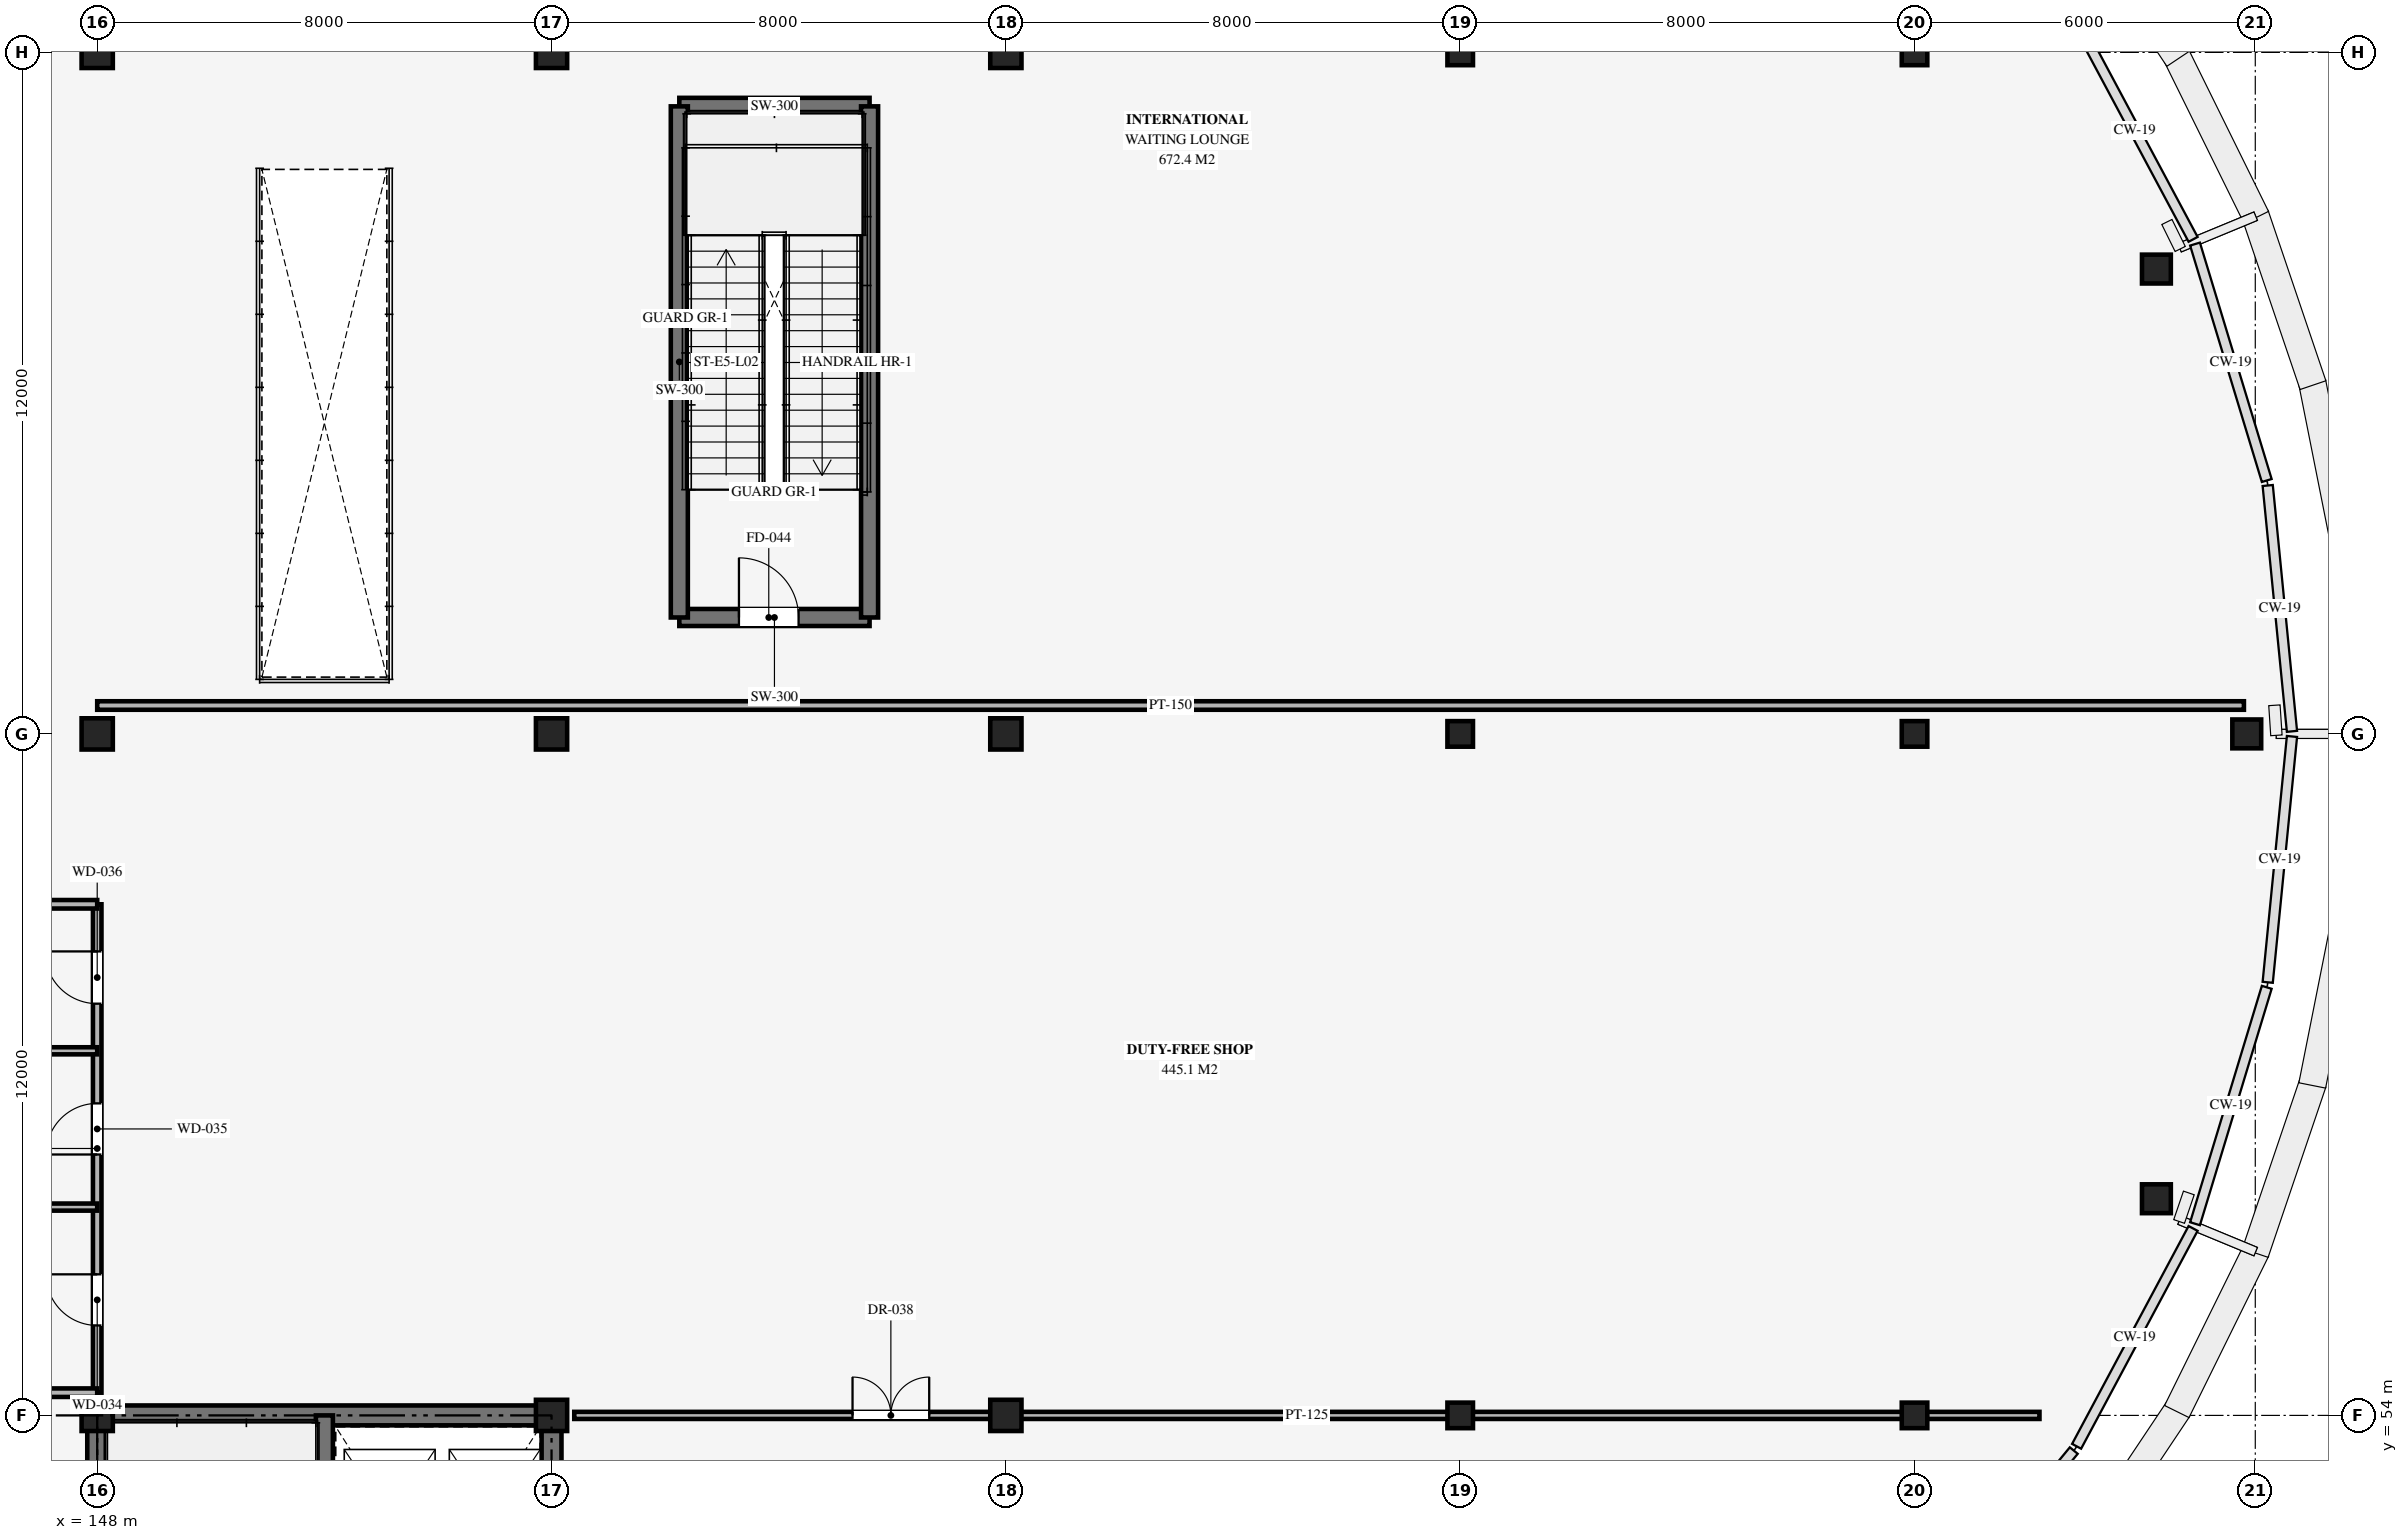
"""IFC4 building model, lengths in metres.
Left out: names, types, materials, properties, quantities, classifications, styles, units other than length and angle.
Written with IfcOpenShell. Run it as: python <this file> out.ifc"""

import sys

from ifc_helpers import new_model, si_unit, direction, frame, frame_2d, origin, origin_2d, place, context, subcontext, project, spatial, rectangle, hollow_circle, extrude, element, fill, save


model = new_model("IFC4")
c1 = context("Model", 3, precision=1e-05, world=origin(), true_north=direction((0.0, 1.0)))
c2 = subcontext(c1, "Body", "Model", "MODEL_VIEW")
j1 = project(units=[si_unit("LENGTHUNIT", "METRE"), si_unit("PLANEANGLEUNIT", "RADIAN")], contexts=[c1])
p1 = place(None, origin())
s1 = spatial("IfcSite", under=j1, at=p1, CompositionType="ELEMENT")
p2 = place(p1, origin())
s2 = spatial("IfcBuilding", under=s1, at=p2, CompositionType="ELEMENT")
p3 = place(p2, frame((0.0, 0.0, 10.2)))
s3 = spatial("IfcBuildingStorey", under=s2, at=p3, CompositionType="ELEMENT", Elevation=10.2)
for number, where, z_axis, x_axis in (
    (1, (148.0, 54.0, 0.0), (0.0, 0.0, 1.0), (1.0, 0.0, 0.0)),
    (2, (148.0, 66.0, 0.0), (0.0, 0.0, 1.0), (1.0, 0.0, 0.0)),
    (3, (148.0, 78.0, 0.0), (0.0, 0.0, 1.0), (1.0, 0.0, 0.0)),
    (4, (156.0, 54.0, 0.0), (0.0, 0.0, 1.0), (1.0, 0.0, 0.0)),
    (5, (156.0, 66.0, 0.0), (0.0, 0.0, 1.0), (1.0, 0.0, 0.0)),
    (6, (156.0, 78.0, 0.0), (0.0, 0.0, 1.0), (1.0, 0.0, 0.0)),
    (7, (164.0, 54.0, 0.0), (0.0, 0.0, 1.0), (1.0, 0.0, 0.0)),
    (8, (164.0, 66.0, 0.0), (0.0, 0.0, 1.0), (1.0, 0.0, 0.0)),
    (9, (164.0, 78.0, 0.0), (0.0, 0.0, 1.0), (1.0, 0.0, 0.0)),
):
    element("IfcColumn", number, at=place(p3, frame(where, z_axis=z_axis, x_axis=x_axis)), inside=s3, PredefinedType="COLUMN", context=c2, shape_type="SweptSolid", body=[
        extrude(rectangle(XDim=0.55, YDim=0.55, at=origin_2d()), origin(), (0.0, 0.0, 1.0), 4.64),
    ])
for number, where, z_axis, x_axis in (
    (10, (172.0, 54.0, 0.0), (0.0, 0.0, 1.0), (1.0, 0.0, 0.0)),
    (11, (172.0, 66.0, 0.0), (0.0, 0.0, 1.0), (1.0, 0.0, 0.0)),
    (12, (172.0, 78.0, 0.0), (0.0, 0.0, 1.0), (1.0, 0.0, 0.0)),
    (13, (180.0, 54.0, 0.0), (0.0, 0.0, 1.0), (1.0, 0.0, 0.0)),
    (14, (180.0, 66.0, 0.0), (0.0, 0.0, 1.0), (1.0, 0.0, 0.0)),
    (15, (180.0, 78.0, 0.0), (0.0, 0.0, 1.0), (1.0, 0.0, 0.0)),
):
    element("IfcColumn", number, at=place(p3, frame(where, z_axis=z_axis, x_axis=x_axis)), inside=s3, PredefinedType="COLUMN", context=c2, shape_type="SweptSolid", body=[
        extrude(rectangle(XDim=0.45, YDim=0.45, at=origin_2d()), origin(), (0.0, 0.0, 1.0), 4.64),
    ])
for number, where, z_axis, x_axis in (
    (16, (184.259, 74.185, 0.0), (0.0, 0.0, 1.0), (1.0, 0.0, 0.0)),
    (17, (185.85, 66.0, 0.0), (0.0, 0.0, 1.0), (1.0, 0.0, 0.0)),
    (18, (184.259, 57.815, 0.0), (0.0, 0.0, 1.0), (1.0, 0.0, 0.0)),
):
    element("IfcColumn", number, at=place(p3, frame(where, z_axis=z_axis, x_axis=x_axis)), inside=s3, PredefinedType="COLUMN", context=c2, shape_type="SweptSolid", body=[
        extrude(hollow_circle(Radius=0.254, WallThickness=0.02, at=origin_2d()), origin(), (0.0, 0.0, 1.0), 4.64),
    ])
p4 = place(p3, frame((148.0, 54.0, 0.0), z_axis=(0.0, 0.0, 1.0), x_axis=(1.0, 0.0, 0.0)))
e19 = element("IfcWall", 19, at=p4, inside=s3, PredefinedType="SHEAR", context=c2, shape_type="SweptSolid", body=[
    extrude(rectangle(XDim=8.0, YDim=0.35, at=frame_2d((4.0, 0.0))), origin(), (0.0, 0.0, 1.0), 4.78),
])
p5 = place(p3, frame((148.0, 42.0, 0.0), z_axis=(0.0, 0.0, 1.0), x_axis=(0.0, 1.0, 0.0)))
e20 = element("IfcWall", 20, at=p5, inside=s3, PredefinedType="SHEAR", context=c2, shape_type="SweptSolid", body=[
    extrude(rectangle(XDim=12.0, YDim=0.35, at=frame_2d((6.0, 0.0))), origin(), (0.0, 0.0, 1.0), 4.78),
])
p6 = place(p3, frame((156.0, 42.0, 0.0), z_axis=(0.0, 0.0, 1.0), x_axis=(0.0, 1.0, 0.0)))
e21 = element("IfcWall", 21, at=p6, inside=s3, PredefinedType="SHEAR", context=c2, shape_type="SweptSolid", body=[
    extrude(rectangle(XDim=12.0, YDim=0.35, at=frame_2d((6.0, 0.0))), origin(), (0.0, 0.0, 1.0), 4.78),
])
p7 = place(p6, frame((1.4, 0.0, 0.0)))
e22 = element("IfcOpeningElement", 22, at=p7, cuts=e21, PredefinedType="OPENING", context=c2, shape_type="SweptSolid", body=[
    extrude(rectangle(XDim=1.5, YDim=2.2, at=frame_2d((0.75, 1.1))), frame((0.0, 0.185, 0.0), z_axis=(0.0, -1.0, 0.0), x_axis=(1.0, 0.0, 0.0)), (0.0, 0.0, 1.0), 0.37),
])
p8 = place(p3, frame((152.0, 54.0, 0.0), z_axis=(0.0, 0.0, 1.0), x_axis=(0.0, -1.0, 0.0)))
e23 = element("IfcWall", 23, at=p8, inside=s3, PredefinedType="SHEAR", context=c2, shape_type="SweptSolid", body=[
    extrude(rectangle(XDim=12.0, YDim=0.3, at=frame_2d((6.0, 0.0))), origin(), (0.0, 0.0, 1.0), 4.78),
])
p9 = place(p8, frame((10.45, 0.0, 0.0)))
e24 = element("IfcOpeningElement", 24, at=p9, cuts=e23, PredefinedType="OPENING", context=c2, shape_type="SweptSolid", body=[
    extrude(rectangle(XDim=1.05, YDim=2.15, at=frame_2d((0.525, 1.075))), frame((0.0, 0.16, 0.0), z_axis=(0.0, -1.0, 0.0), x_axis=(1.0, 0.0, 0.0)), (0.0, 0.0, 1.0), 0.32),
])
p10 = place(p3, frame((158.25, 68.05, 0.0), z_axis=(0.0, 0.0, 1.0), x_axis=(1.0, 0.0, 0.0)))
e25 = element("IfcWall", 25, at=p10, inside=s3, PredefinedType="SHEAR", context=c2, shape_type="SweptSolid", body=[
    extrude(rectangle(XDim=3.35, YDim=0.3, at=frame_2d((1.675, 0.0))), origin(), (0.0, 0.0, 1.0), 4.78),
])
p11 = place(p10, frame((1.05, 0.0, 0.0)))
e26 = element("IfcOpeningElement", 26, at=p11, cuts=e25, PredefinedType="OPENING", context=c2, shape_type="SweptSolid", body=[
    extrude(rectangle(XDim=1.05, YDim=2.15, at=frame_2d((0.525, 1.075))), frame((0.0, 0.16, 0.0), z_axis=(0.0, -1.0, 0.0), x_axis=(1.0, 0.0, 0.0)), (0.0, 0.0, 1.0), 0.32),
])
p12 = place(p3, frame((158.25, 77.05, 0.0), z_axis=(0.0, 0.0, 1.0), x_axis=(1.0, 0.0, 0.0)))
e27 = element("IfcWall", 27, at=p12, inside=s3, PredefinedType="SHEAR", context=c2, shape_type="SweptSolid", body=[
    extrude(rectangle(XDim=3.35, YDim=0.3, at=frame_2d((1.675, 0.0))), origin(), (0.0, 0.0, 1.0), 4.78),
])
for number, where, z_axis, x_axis in (
    (28, (158.25, 68.05, 0.0), (0.0, 0.0, 1.0), (0.0, 1.0, 0.0)),
    (29, (161.6, 68.05, 0.0), (0.0, 0.0, 1.0), (0.0, 1.0, 0.0)),
):
    element("IfcWall", number, at=place(p3, frame(where, z_axis=z_axis, x_axis=x_axis)), inside=s3, PredefinedType="SHEAR", context=c2, shape_type="SweptSolid", body=[
        extrude(rectangle(XDim=9.0, YDim=0.3, at=frame_2d((4.5, 0.0))), origin(), (0.0, 0.0, 1.0), 4.78),
    ])
p13 = place(p3, frame((148.0, 54.4, 0.0), z_axis=(0.0, 0.0, 1.0), x_axis=(0.0, 1.0, 0.0)))
e30 = element("IfcWall", 30, at=p13, inside=s3, PredefinedType="PARTITIONING", context=c2, shape_type="SweptSolid", body=[
    extrude(rectangle(XDim=8.6, YDim=0.15, at=frame_2d((4.3, 0.0))), origin(), (0.0, 0.0, 1.0), 3.65),
])
p14 = place(p13, frame((1.184, 0.0, 0.0)))
e31 = element("IfcOpeningElement", 31, at=p14, cuts=e30, PredefinedType="OPENING", context=c2, shape_type="SweptSolid", body=[
    extrude(rectangle(XDim=0.9, YDim=2.1, at=frame_2d((0.45, 1.05))), frame((0.0, 0.085, 0.0), z_axis=(0.0, -1.0, 0.0), x_axis=(1.0, 0.0, 0.0)), (0.0, 0.0, 1.0), 0.17),
])
p15 = place(p13, frame((4.194, 0.0, 0.0)))
e32 = element("IfcOpeningElement", 32, at=p15, cuts=e30, PredefinedType="OPENING", context=c2, shape_type="SweptSolid", body=[
    extrude(rectangle(XDim=0.9, YDim=2.1, at=frame_2d((0.45, 1.05))), frame((0.0, 0.085, 0.0), z_axis=(0.0, -1.0, 0.0), x_axis=(1.0, 0.0, 0.0)), (0.0, 0.0, 1.0), 0.17),
])
p16 = place(p13, frame((6.85, 0.0, 0.0)))
e33 = element("IfcOpeningElement", 33, at=p16, cuts=e30, PredefinedType="OPENING", context=c2, shape_type="SweptSolid", body=[
    extrude(rectangle(XDim=0.92, YDim=2.1, at=frame_2d((0.46, 1.05))), frame((0.0, 0.085, 0.0), z_axis=(0.0, -1.0, 0.0), x_axis=(1.0, 0.0, 0.0)), (0.0, 0.0, 1.0), 0.17),
])
for number, where, z_axis, x_axis in (
    (34, (140.0, 63.0, 0.0), (0.0, 0.0, 1.0), (1.0, 0.0, 0.0)),
    (35, (140.0, 54.4, 0.0), (0.0, 0.0, 1.0), (1.0, 0.0, 0.0)),
):
    element("IfcWall", number, at=place(p3, frame(where, z_axis=z_axis, x_axis=x_axis)), inside=s3, PredefinedType="PARTITIONING", context=c2, shape_type="SweptSolid", body=[
        extrude(rectangle(XDim=8.0, YDim=0.15, at=frame_2d((4.0, 0.0))), origin(), (0.0, 0.0, 1.0), 3.65),
    ])
for number, where, z_axis, x_axis in (
    (36, (140.0, 57.668, 0.0), (0.0, 0.0, 1.0), (1.0, 0.0, 0.0)),
    (37, (140.0, 60.42, 0.0), (0.0, 0.0, 1.0), (1.0, 0.0, 0.0)),
):
    element("IfcWall", number, at=place(p3, frame(where, z_axis=z_axis, x_axis=x_axis)), inside=s3, PredefinedType="PARTITIONING", context=c2, shape_type="SweptSolid", body=[
        extrude(rectangle(XDim=8.0, YDim=0.125, at=frame_2d((4.0, 0.0))), origin(), (0.0, 0.0, 1.0), 3.65),
    ])
p17 = place(p3, frame((148.0, 66.5, 0.0), z_axis=(0.0, 0.0, 1.0), x_axis=(1.0, 0.0, 0.0)))
e38 = element("IfcWall", 38, at=p17, inside=s3, PredefinedType="PARTITIONING", context=c2, shape_type="SweptSolid", body=[
    extrude(rectangle(XDim=37.8, YDim=0.15, at=frame_2d((18.9, 0.0))), origin(), (0.0, 0.0, 1.0), 3.65),
])
p18 = place(p3, frame((156.4, 54.0, 0.0), z_axis=(0.0, 0.0, 1.0), x_axis=(1.0, 0.0, 0.0)))
e39 = element("IfcWall", 39, at=p18, inside=s3, PredefinedType="PARTITIONING", context=c2, shape_type="SweptSolid", body=[
    extrude(rectangle(XDim=25.8, YDim=0.125, at=frame_2d((12.9, 0.0))), origin(), (0.0, 0.0, 1.0), 3.65),
])
p19 = place(p18, frame((4.9, 0.0, 0.0)))
e40 = element("IfcOpeningElement", 40, at=p19, cuts=e39, PredefinedType="OPENING", context=c2, shape_type="SweptSolid", body=[
    extrude(rectangle(XDim=1.35, YDim=2.15, at=frame_2d((0.675, 1.075))), frame((0.0, 0.073, 0.0), z_axis=(0.0, -1.0, 0.0), x_axis=(1.0, 0.0, 0.0)), (0.0, 0.0, 1.0), 0.145),
])
p20 = place(p11, origin())
e41 = element("IfcDoor", 41, at=p20, inside=s3, OperationType="SINGLE_SWING_LEFT", PredefinedType="DOOR", context=c2, shape_type="SweptSolid", body=[
    extrude(rectangle(XDim=1.05, YDim=2.15, at=frame_2d((0.525, 1.075))), frame((0.0, 0.025, 0.0), z_axis=(0.0, -1.0, 0.0), x_axis=(1.0, 0.0, 0.0)), (0.0, 0.0, 1.0), 0.05),
])
fill(e26, e41)
p21 = place(p14, origin())
e42 = element("IfcDoor", 42, at=p21, inside=s3, OperationType="SINGLE_SWING_RIGHT", PredefinedType="DOOR", context=c2, shape_type="SweptSolid", body=[
    extrude(rectangle(XDim=0.9, YDim=2.1, at=frame_2d((0.45, 1.05))), frame((0.0, 0.025, 0.0), z_axis=(0.0, -1.0, 0.0), x_axis=(1.0, 0.0, 0.0)), (0.0, 0.0, 1.0), 0.05),
])
fill(e31, e42)
p22 = place(p15, origin())
e43 = element("IfcDoor", 43, at=p22, inside=s3, OperationType="SINGLE_SWING_LEFT", PredefinedType="DOOR", context=c2, shape_type="SweptSolid", body=[
    extrude(rectangle(XDim=0.9, YDim=2.1, at=frame_2d((0.45, 1.05))), frame((0.0, 0.025, 0.0), z_axis=(0.0, -1.0, 0.0), x_axis=(1.0, 0.0, 0.0)), (0.0, 0.0, 1.0), 0.05),
])
fill(e32, e43)
p23 = place(p16, origin())
e44 = element("IfcDoor", 44, at=p23, inside=s3, OperationType="SINGLE_SWING_RIGHT", PredefinedType="DOOR", context=c2, shape_type="SweptSolid", body=[
    extrude(rectangle(XDim=0.92, YDim=2.1, at=frame_2d((0.46, 1.05))), frame((0.0, 0.025, 0.0), z_axis=(0.0, -1.0, 0.0), x_axis=(1.0, 0.0, 0.0)), (0.0, 0.0, 1.0), 0.05),
])
fill(e33, e44)
p24 = place(p19, origin())
e45 = element("IfcDoor", 45, at=p24, inside=s3, OperationType="DOUBLE_DOOR_SINGLE_SWING", PredefinedType="DOOR", context=c2, shape_type="SweptSolid", body=[
    extrude(rectangle(XDim=1.35, YDim=2.15, at=frame_2d((0.675, 1.075))), frame((0.0, 0.025, 0.0), z_axis=(0.0, -1.0, 0.0), x_axis=(1.0, 0.0, 0.0)), (0.0, 0.0, 1.0), 0.05),
])
fill(e40, e45)
save(model, sys.argv[1])
